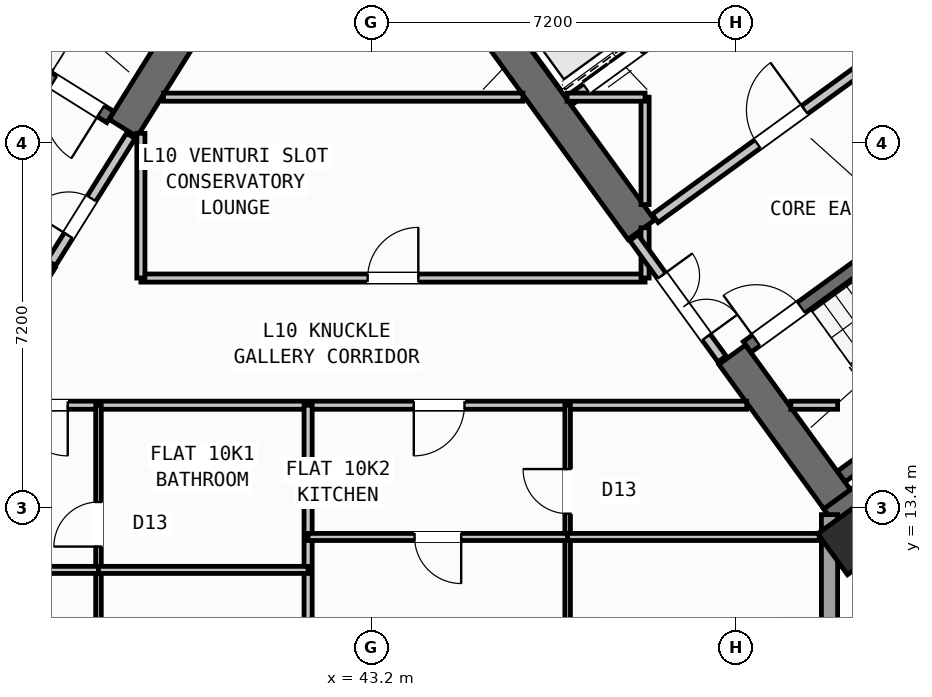
"""IFC4 building model, lengths in metres.
Left out: names, types, materials, properties, quantities, classifications, styles, units other than length and angle.
Written with IfcOpenShell. Run it as: python <this file> out.ifc"""

import sys

from ifc_helpers import new_model, si_unit, direction, frame, frame_2d, origin, origin_2d, place, context, subcontext, project, spatial, rectangle, hollow_rectangle, extrude, source, transform, mapped, element, fill, save


model = new_model("IFC4")
c1 = context("Model", 3, precision=1e-05, world=origin(), true_north=direction((0.0, 1.0)))
c2 = subcontext(c1, "Body", "Model", "MODEL_VIEW")
j1 = project(units=[si_unit("LENGTHUNIT", "METRE"), si_unit("PLANEANGLEUNIT", "RADIAN")], contexts=[c1])
p1 = place(None, origin())
s1 = spatial("IfcSite", under=j1, at=p1, CompositionType="ELEMENT")
p2 = place(p1, origin())
s2 = spatial("IfcBuilding", under=s1, at=p2, CompositionType="ELEMENT")
p3 = place(p2, frame((0.0, 0.0, 42.0)))
s3 = spatial("IfcBuildingStorey", under=s2, at=p3, CompositionType="ELEMENT", Elevation=42.0)
p4 = place(p3, frame((40.168, 23.88, 0.0), z_axis=(0.0, 0.0, 1.0), x_axis=(-0.529893103397, -0.8480644427, 0.0)))
e1 = element("IfcWall", 1, at=p4, inside=s3, PredefinedType="SHEAR", context=c2, shape_type="SweptSolid", body=[
    extrude(rectangle(XDim=3.525, YDim=0.65, at=frame_2d((1.763, 0.0))), origin(), (0.0, 0.0, 1.0), 3.35),
])
p5 = place(p3, frame((36.683, 18.304, 0.0), z_axis=(0.0, 0.0, 1.0), x_axis=(-0.529899109053, -0.848060690178, 0.0)))
e2 = element("IfcWall", 2, at=p5, inside=s3, PredefinedType="SHEAR", context=c2, shape_type="SweptSolid", body=[
    extrude(rectangle(XDim=6.375, YDim=0.65, at=frame_2d((3.188, 0.0))), origin(), (0.0, 0.0, 1.0), 3.35),
])
p6 = place(p3, frame((52.318, 13.11, 0.0), z_axis=(0.0, 0.0, 1.0), x_axis=(0.809019445368, 0.587781878776, 0.0)))
e3 = element("IfcWall", 3, at=p6, inside=s3, PredefinedType="SHEAR", context=c2, shape_type="SweptSolid", body=[
    extrude(rectangle(XDim=12.44, YDim=0.65, at=frame_2d((6.22, 0.0))), origin(), (0.0, 0.0, 1.0), 3.35),
])
p7 = place(p3, frame((52.39, 13.564, 0.0), z_axis=(0.0, 0.0, 1.0), x_axis=(-0.58779688989, 0.809008539037, 0.0)))
e4 = element("IfcWall", 4, at=p7, inside=s3, PredefinedType="SHEAR", context=c2, shape_type="SweptSolid", body=[
    extrude(rectangle(XDim=3.525, YDim=0.65, at=frame_2d((1.763, 0.0))), origin(), (0.0, 0.0, 1.0), 3.35),
])
p8 = place(p3, frame((48.526, 18.884, 0.0), z_axis=(0.0, 0.0, 1.0), x_axis=(-0.58777996584, 0.809020835181, 0.0)))
e5 = element("IfcWall", 5, at=p8, inside=s3, PredefinedType="SHEAR", context=c2, shape_type="SweptSolid", body=[
    extrude(rectangle(XDim=6.375, YDim=0.65, at=frame_2d((3.188, 0.0))), origin(), (0.0, 0.0, 1.0), 3.35),
])
m1 = source(origin(), c2, "Body", "SweptSolid", [
    extrude(hollow_rectangle(XDim=1.0, YDim=1.0, WallThickness=0.04, at=origin_2d()), origin(), (0.0, 0.0, 1.0), 3.6),
])
p9 = place(p3, frame((52.705, 12.773, 0.0), z_axis=(0.0, 0.0, 1.0), x_axis=(0.809016994375, 0.587785252292, 0.0)))
e6 = element("IfcColumn", 6, at=p9, inside=s3, PredefinedType="COLUMN", context=c2, shape_type="MappedRepresentation", body=[
    mapped(m1, transform((0.0, 0.0, 0.0), scale=1.0)),
])
p10 = place(p3, frame((56.581, 7.439, 0.0), z_axis=(0.0, 0.0, 1.0), x_axis=(-0.587785875463, 0.809016541614, 0.0)))
e7 = element("IfcWall", 7, at=p10, inside=s3, PredefinedType="STANDARD", context=c2, shape_type="SweptSolid", body=[
    extrude(rectangle(XDim=6.774, YDim=0.32, at=frame_2d((3.387, 0.0))), origin(), (0.0, 0.0, 1.0), 2.725),
])
p11 = place(p10, frame((1.556, 0.0, 0.8)))
e8 = element("IfcOpeningElement", 8, at=p11, cuts=e7, PredefinedType="OPENING", context=c2, shape_type="SweptSolid", body=[
    extrude(rectangle(XDim=2.1, YDim=1.55, at=frame_2d((1.05, 0.775))), frame((0.0, 0.17, 0.0), z_axis=(0.0, -1.0, 0.0), x_axis=(1.0, 0.0, 0.0)), (0.0, 0.0, 1.0), 0.34),
])
p12 = place(p3, frame((52.24, 13.261, 0.0), z_axis=(0.0, 0.0, 1.0), x_axis=(0.0, -1.0, 0.0)))
e9 = element("IfcWall", 9, at=p12, inside=s3, PredefinedType="STANDARD", context=c2, shape_type="SweptSolid", body=[
    extrude(rectangle(XDim=9.795, YDim=0.32, at=frame_2d((4.897, 0.0))), origin(), (0.0, 0.0, 1.0), 3.35),
])
p13 = place(p12, frame((2.199, 0.0, 0.8)))
e10 = element("IfcOpeningElement", 10, at=p13, cuts=e9, PredefinedType="OPENING", context=c2, shape_type="SweptSolid", body=[
    extrude(rectangle(XDim=2.1, YDim=1.55, at=frame_2d((1.05, 0.775))), frame((0.0, 0.17, 0.0), z_axis=(0.0, -1.0, 0.0), x_axis=(1.0, 0.0, 0.0)), (0.0, 0.0, 1.0), 0.34),
])
p14 = place(p12, frame((6.88, 0.0, 0.85)))
e11 = element("IfcOpeningElement", 11, at=p14, cuts=e9, PredefinedType="OPENING", context=c2, shape_type="SweptSolid", body=[
    extrude(rectangle(XDim=1.8, YDim=1.5, at=frame_2d((0.9, 0.75))), frame((0.0, 0.17, 0.0), z_axis=(0.0, -1.0, 0.0), x_axis=(1.0, 0.0, 0.0)), (0.0, 0.0, 1.0), 0.34),
])
p15 = place(p3, frame((38.046, 21.108, 0.0), z_axis=(0.0, 0.0, 1.0), x_axis=(-0.848054434086, 0.529909121291, 0.0)))
e12 = element("IfcWall", 12, at=p15, inside=s3, PredefinedType="SHEAR", context=c2, shape_type="SweptSolid", body=[
    extrude(rectangle(XDim=7.33, YDim=0.26, at=frame_2d((3.665, 0.0))), origin(), (0.0, 0.0, 1.0), 3.35),
])
p16 = place(p15, frame((0.22, 0.0, 0.0)))
e13 = element("IfcOpeningElement", 13, at=p16, cuts=e12, PredefinedType="OPENING", context=c2, shape_type="SweptSolid", body=[
    extrude(rectangle(XDim=1.1, YDim=2.1, at=frame_2d((0.55, 1.05))), frame((0.0, 0.14, 0.0), z_axis=(0.0, -1.0, 0.0), x_axis=(1.0, 0.0, 0.0)), (0.0, 0.0, 1.0), 0.28),
])
p17 = place(p3, frame((52.472, 14.013, 0.0), z_axis=(0.0, 0.0, 1.0), x_axis=(0.809028366311, 0.587769599847, 0.0)))
e14 = element("IfcWall", 14, at=p17, inside=s3, PredefinedType="SHEAR", context=c2, shape_type="SweptSolid", body=[
    extrude(rectangle(XDim=7.33, YDim=0.26, at=frame_2d((3.665, 0.0))), origin(), (0.0, 0.0, 1.0), 3.35),
])
p18 = place(p3, frame((50.615, 16.57, 0.0), z_axis=(0.0, 0.0, 1.0), x_axis=(0.809028366311, 0.587769599847, 0.0)))
e15 = element("IfcWall", 15, at=p18, inside=s3, PredefinedType="SHEAR", context=c2, shape_type="SweptSolid", body=[
    extrude(rectangle(XDim=7.33, YDim=0.26, at=frame_2d((3.665, 0.0))), origin(), (0.0, 0.0, 1.0), 3.35),
])
p19 = place(p18, frame((0.22, 0.0, 0.0)))
e16 = element("IfcOpeningElement", 16, at=p19, cuts=e15, PredefinedType="OPENING", context=c2, shape_type="SweptSolid", body=[
    extrude(rectangle(XDim=1.1, YDim=2.1, at=frame_2d((0.55, 1.05))), frame((0.0, 0.14, 0.0), z_axis=(0.0, -1.0, 0.0), x_axis=(1.0, 0.0, 0.0)), (0.0, 0.0, 1.0), 0.28),
])
p20 = place(p3, frame((47.106, 21.437, 0.0), z_axis=(0.0, 0.0, 1.0), x_axis=(0.809012514015, 0.58779141893, 0.0)))
e17 = element("IfcWall", 17, at=p20, inside=s3, PredefinedType="STANDARD", context=c2, shape_type="SweptSolid", body=[
    extrude(rectangle(XDim=3.398, YDim=0.2, at=frame_2d((1.699, 0.0))), origin(), (0.0, 0.0, 1.0), 3.34),
])
p21 = place(p20, frame((0.408, 0.0, 0.0)))
e18 = element("IfcOpeningElement", 18, at=p21, cuts=e17, PredefinedType="OPENING", context=c2, shape_type="SweptSolid", body=[
    extrude(rectangle(XDim=1.3, YDim=2.2, at=frame_2d((0.65, 1.1))), frame((0.0, 0.11, 0.0), z_axis=(0.0, -1.0, 0.0), x_axis=(1.0, 0.0, 0.0)), (0.0, 0.0, 1.0), 0.22),
])
p22 = place(p3, frame((48.799, 19.107, 0.0), z_axis=(0.0, 0.0, 1.0), x_axis=(0.809012959416, 0.587790805897, 0.0)))
e19 = element("IfcWall", 19, at=p22, inside=s3, PredefinedType="STANDARD", context=c2, shape_type="SweptSolid", body=[
    extrude(rectangle(XDim=5.718, YDim=0.2, at=frame_2d((2.859, 0.0))), origin(), (0.0, 0.0, 1.0), 3.34),
])
p23 = place(p22, frame((2.498, 0.0, 0.0)))
e20 = element("IfcOpeningElement", 20, at=p23, cuts=e19, PredefinedType="OPENING", context=c2, shape_type="SweptSolid", body=[
    extrude(rectangle(XDim=1.15, YDim=2.1, at=frame_2d((0.575, 1.05))), frame((0.0, 0.11, 0.0), z_axis=(0.0, -1.0, 0.0), x_axis=(1.0, 0.0, 0.0)), (0.0, 0.0, 1.0), 0.22),
])
p24 = place(p3, frame((38.451, 20.737, 0.0), z_axis=(0.0, 0.0, 1.0), x_axis=(-0.529924799939, -0.848044637038, 0.0)))
e21 = element("IfcWall", 21, at=p24, inside=s3, PredefinedType="STANDARD", context=c2, shape_type="SweptSolid", body=[
    extrude(rectangle(XDim=2.96, YDim=0.2, at=frame_2d((1.48, 0.0))), origin(), (0.0, 0.0, 1.0), 3.34),
])
p25 = place(p24, frame((1.46, 0.0, 0.0)))
e22 = element("IfcOpeningElement", 22, at=p25, cuts=e21, PredefinedType="OPENING", context=c2, shape_type="SweptSolid", body=[
    extrude(rectangle(XDim=0.86, YDim=2.05, at=frame_2d((0.43, 1.025))), frame((0.0, 0.11, 0.0), z_axis=(0.0, -1.0, 0.0), x_axis=(1.0, 0.0, 0.0)), (0.0, 0.0, 1.0), 0.22),
])
p26 = place(p3, frame((35.296, 15.42, 0.0), z_axis=(0.0, 0.0, 1.0), x_axis=(1.0, 0.0, 0.0)))
e23 = element("IfcWall", 23, at=p26, inside=s3, PredefinedType="PARTITIONING", context=c2, shape_type="SweptSolid", body=[
    extrude(rectangle(XDim=15.311, YDim=0.16, at=frame_2d((7.655, 0.0))), origin(), (0.0, 0.0, 1.0), 3.34),
])
p27 = place(p26, frame((0.91, 0.0, 0.0)))
e24 = element("IfcOpeningElement", 24, at=p27, cuts=e23, PredefinedType="OPENING", context=c2, shape_type="SweptSolid", body=[
    extrude(rectangle(XDim=1.0, YDim=2.1, at=frame_2d((0.5, 1.05))), frame((0.0, 0.09, 0.0), z_axis=(0.0, -1.0, 0.0), x_axis=(1.0, 0.0, 0.0)), (0.0, 0.0, 1.0), 0.18),
])
p28 = place(p26, frame((8.74, 0.0, 0.0)))
e25 = element("IfcOpeningElement", 25, at=p28, cuts=e23, PredefinedType="OPENING", context=c2, shape_type="SweptSolid", body=[
    extrude(rectangle(XDim=1.0, YDim=2.1, at=frame_2d((0.5, 1.05))), frame((0.0, 0.09, 0.0), z_axis=(0.0, -1.0, 0.0), x_axis=(1.0, 0.0, 0.0)), (0.0, 0.0, 1.0), 0.18),
])
p29 = place(p3, frame((51.477, 15.42, 0.0), z_axis=(0.0, 0.0, 1.0), x_axis=(1.0, 0.0, 0.0)))
e26 = element("IfcWall", 26, at=p29, inside=s3, PredefinedType="PARTITIONING", context=c2, shape_type="SweptSolid", body=[
    extrude(rectangle(XDim=0.923, YDim=0.16, at=frame_2d((0.461, 0.0))), origin(), (0.0, 0.0, 1.0), 3.34),
])
p30 = place(p3, frame((38.65, 17.93, 0.0), z_axis=(0.0, 0.0, 1.0), x_axis=(1.0, 0.0, 0.0)))
e27 = element("IfcWall", 27, at=p30, inside=s3, PredefinedType="PARTITIONING", context=c2, shape_type="SweptSolid", body=[
    extrude(rectangle(XDim=9.95, YDim=0.16, at=frame_2d((4.975, 0.0))), origin(), (0.0, 0.0, 1.0), 3.34),
])
p31 = place(p30, frame((4.475, 0.0, 0.0)))
e28 = element("IfcOpeningElement", 28, at=p31, cuts=e27, PredefinedType="OPENING", context=c2, shape_type="SweptSolid", body=[
    extrude(rectangle(XDim=1.0, YDim=2.1, at=frame_2d((0.5, 1.05))), frame((0.0, 0.09, 0.0), z_axis=(0.0, -1.0, 0.0), x_axis=(1.0, 0.0, 0.0)), (0.0, 0.0, 1.0), 0.18),
])
p32 = place(p3, frame((38.65, 17.93, 0.0), z_axis=(0.0, 0.0, 1.0), x_axis=(0.0, 1.0, 0.0)))
e29 = element("IfcWall", 29, at=p32, inside=s3, PredefinedType="PARTITIONING", context=c2, shape_type="SweptSolid", body=[
    extrude(rectangle(XDim=2.857, YDim=0.16, at=frame_2d((1.428, 0.0))), origin(), (0.0, 0.0, 1.0), 3.34),
])
p33 = place(p3, frame((48.6, 17.93, 0.0), z_axis=(0.0, 0.0, 1.0), x_axis=(0.0, 1.0, 0.0)))
e30 = element("IfcWall", 30, at=p33, inside=s3, PredefinedType="PARTITIONING", context=c2, shape_type="SweptSolid", body=[
    extrude(rectangle(XDim=0.993, YDim=0.16, at=frame_2d((0.496, 0.0))), origin(), (0.0, 0.0, 1.0), 3.34),
])
p34 = place(p3, frame((48.6, 19.38, 0.0), z_axis=(0.0, 0.0, 1.0), x_axis=(0.0, 1.0, 0.0)))
e31 = element("IfcWall", 31, at=p34, inside=s3, PredefinedType="PARTITIONING", context=c2, shape_type="SweptSolid", body=[
    extrude(rectangle(XDim=2.12, YDim=0.16, at=frame_2d((1.06, 0.0))), origin(), (0.0, 0.0, 1.0), 3.34),
])
p35 = place(p3, frame((39.095, 21.5, 0.0), z_axis=(0.0, 0.0, 1.0), x_axis=(1.0, 0.0, 0.0)))
e32 = element("IfcWall", 32, at=p35, inside=s3, PredefinedType="PARTITIONING", context=c2, shape_type="SweptSolid", body=[
    extrude(rectangle(XDim=7.094, YDim=0.16, at=frame_2d((3.547, 0.0))), origin(), (0.0, 0.0, 1.0), 3.34),
])
p36 = place(p3, frame((47.06, 21.5, 0.0), z_axis=(0.0, 0.0, 1.0), x_axis=(1.0, 0.0, 0.0)))
e33 = element("IfcWall", 33, at=p36, inside=s3, PredefinedType="PARTITIONING", context=c2, shape_type="SweptSolid", body=[
    extrude(rectangle(XDim=1.54, YDim=0.16, at=frame_2d((0.77, 0.0))), origin(), (0.0, 0.0, 1.0), 3.34),
])
p37 = place(p3, frame((50.119, 16.333, 0.0), z_axis=(0.0, 0.0, 1.0), x_axis=(-0.587749856981, 0.809042709391, 0.0)))
e34 = element("IfcWall", 34, at=p37, inside=s3, PredefinedType="STANDARD", context=c2, shape_type="SweptSolid", body=[
    extrude(rectangle(XDim=2.96, YDim=0.2, at=frame_2d((1.48, 0.0))), origin(), (0.0, 0.0, 1.0), 3.34),
])
p38 = place(p37, frame((0.53, 0.0, 0.0)))
e35 = element("IfcOpeningElement", 35, at=p38, cuts=e34, PredefinedType="OPENING", context=c2, shape_type="SweptSolid", body=[
    extrude(rectangle(XDim=1.5, YDim=2.15, at=frame_2d((0.75, 1.075))), frame((0.0, 0.11, 0.0), z_axis=(0.0, -1.0, 0.0), x_axis=(1.0, 0.0, 0.0)), (0.0, 0.0, 1.0), 0.22),
])
p39 = place(p3, frame((41.95, 1.96, 0.0), z_axis=(0.0, 0.0, 1.0), x_axis=(0.0, 1.0, 0.0)))
e36 = element("IfcWall", 36, at=p39, inside=s3, PredefinedType="PARTITIONING", context=c2, shape_type="SweptSolid", body=[
    extrude(rectangle(XDim=13.46, YDim=0.16, at=frame_2d((6.73, 0.0))), origin(), (0.0, 0.0, 1.0), 3.34),
])
p40 = place(p3, frame((37.813, 1.96, 0.0), z_axis=(0.0, 0.0, 1.0), x_axis=(0.0, 1.0, 0.0)))
e37 = element("IfcWall", 37, at=p40, inside=s3, PredefinedType="PARTITIONING", context=c2, shape_type="SweptSolid", body=[
    extrude(rectangle(XDim=13.46, YDim=0.11, at=frame_2d((6.73, 0.0))), origin(), (0.0, 0.0, 1.0), 3.34),
])
p41 = place(p40, frame((5.5, 0.0, 0.0)))
e38 = element("IfcOpeningElement", 38, at=p41, cuts=e37, PredefinedType="OPENING", context=c2, shape_type="SweptSolid", body=[
    extrude(rectangle(XDim=0.92, YDim=2.08, at=frame_2d((0.46, 1.04))), frame((0.0, 0.065, 0.0), z_axis=(0.0, -1.0, 0.0), x_axis=(1.0, 0.0, 0.0)), (0.0, 0.0, 1.0), 0.13),
])
p42 = place(p40, frame((10.67, 0.0, 0.0)))
e39 = element("IfcOpeningElement", 39, at=p42, cuts=e37, PredefinedType="OPENING", context=c2, shape_type="SweptSolid", body=[
    extrude(rectangle(XDim=0.88, YDim=2.08, at=frame_2d((0.44, 1.04))), frame((0.0, 0.065, 0.0), z_axis=(0.0, -1.0, 0.0), x_axis=(1.0, 0.0, 0.0)), (0.0, 0.0, 1.0), 0.13),
])
p43 = place(p3, frame((33.702, 12.17, 0.0), z_axis=(0.0, 0.0, 1.0), x_axis=(1.0, 0.0, 0.0)))
e40 = element("IfcWall", 40, at=p43, inside=s3, PredefinedType="PLUMBINGWALL", context=c2, shape_type="SweptSolid", body=[
    extrude(rectangle(XDim=4.111, YDim=0.14, at=frame_2d((2.056, 0.0))), origin(), (0.0, 0.0, 1.0), 2.525),
])
p44 = place(p43, frame((0.795, 0.0, 0.0)))
e41 = element("IfcOpeningElement", 41, at=p44, cuts=e40, PredefinedType="OPENING", context=c2, shape_type="SweptSolid", body=[
    extrude(rectangle(XDim=0.92, YDim=2.08, at=frame_2d((0.46, 1.04))), frame((0.0, 0.08, 0.0), z_axis=(0.0, -1.0, 0.0), x_axis=(1.0, 0.0, 0.0)), (0.0, 0.0, 1.0), 0.16),
])
p45 = place(p3, frame((37.813, 12.17, 0.0), z_axis=(0.0, 0.0, 1.0), x_axis=(1.0, 0.0, 0.0)))
e42 = element("IfcWall", 42, at=p45, inside=s3, PredefinedType="PLUMBINGWALL", context=c2, shape_type="SweptSolid", body=[
    extrude(rectangle(XDim=4.137, YDim=0.14, at=frame_2d((2.068, 0.0))), origin(), (0.0, 0.0, 1.0), 2.525),
])
p46 = place(p3, frame((47.072, 1.96, 0.0), z_axis=(0.0, 0.0, 1.0), x_axis=(0.0, 1.0, 0.0)))
e43 = element("IfcWall", 43, at=p46, inside=s3, PredefinedType="PARTITIONING", context=c2, shape_type="SweptSolid", body=[
    extrude(rectangle(XDim=13.46, YDim=0.11, at=frame_2d((6.73, 0.0))), origin(), (0.0, 0.0, 1.0), 3.34),
])
p47 = place(p46, frame((6.6, 0.0, 0.0)))
e44 = element("IfcOpeningElement", 44, at=p47, cuts=e43, PredefinedType="OPENING", context=c2, shape_type="SweptSolid", body=[
    extrude(rectangle(XDim=0.92, YDim=2.08, at=frame_2d((0.46, 1.04))), frame((0.0, 0.065, 0.0), z_axis=(0.0, -1.0, 0.0), x_axis=(1.0, 0.0, 0.0)), (0.0, 0.0, 1.0), 0.13),
])
p48 = place(p46, frame((11.32, 0.0, 0.0)))
e45 = element("IfcOpeningElement", 45, at=p48, cuts=e43, PredefinedType="OPENING", context=c2, shape_type="SweptSolid", body=[
    extrude(rectangle(XDim=0.88, YDim=2.08, at=frame_2d((0.44, 1.04))), frame((0.0, 0.065, 0.0), z_axis=(0.0, -1.0, 0.0), x_axis=(1.0, 0.0, 0.0)), (0.0, 0.0, 1.0), 0.13),
])
p49 = place(p3, frame((41.95, 12.82, 0.0), z_axis=(0.0, 0.0, 1.0), x_axis=(1.0, 0.0, 0.0)))
e46 = element("IfcWall", 46, at=p49, inside=s3, PredefinedType="PLUMBINGWALL", context=c2, shape_type="SweptSolid", body=[
    extrude(rectangle(XDim=5.122, YDim=0.14, at=frame_2d((2.561, 0.0))), origin(), (0.0, 0.0, 1.0), 2.525),
])
p50 = place(p49, frame((2.101, 0.0, 0.0)))
e47 = element("IfcOpeningElement", 47, at=p50, cuts=e46, PredefinedType="OPENING", context=c2, shape_type="SweptSolid", body=[
    extrude(rectangle(XDim=0.92, YDim=2.08, at=frame_2d((0.46, 1.04))), frame((0.0, 0.08, 0.0), z_axis=(0.0, -1.0, 0.0), x_axis=(1.0, 0.0, 0.0)), (0.0, 0.0, 1.0), 0.16),
])
p51 = place(p3, frame((47.072, 12.82, 0.0), z_axis=(0.0, 0.0, 1.0), x_axis=(1.0, 0.0, 0.0)))
e48 = element("IfcWall", 48, at=p51, inside=s3, PredefinedType="PLUMBINGWALL", context=c2, shape_type="SweptSolid", body=[
    extrude(rectangle(XDim=4.967, YDim=0.14, at=frame_2d((2.483, 0.0))), origin(), (0.0, 0.0, 1.0), 2.525),
])
m2 = source(origin(), c2, "Body", "SweptSolid", [
    extrude(rectangle(XDim=1.1, YDim=2.1, at=frame_2d((0.55, 1.05))), frame((0.0, 0.025, 0.0), z_axis=(0.0, -1.0, 0.0), x_axis=(1.0, 0.0, 0.0)), (0.0, 0.0, 1.0), 0.05),
])
p52 = place(p16, origin())
e49 = element("IfcDoor", 49, at=p52, inside=s3, OperationType="SINGLE_SWING_LEFT", PredefinedType="DOOR", context=c2, shape_type="MappedRepresentation", body=[
    mapped(m2, transform((0.0, 0.0, 0.0), scale=1.0)),
])
fill(e13, e49)
p53 = place(p19, origin())
e50 = element("IfcDoor", 50, at=p53, inside=s3, OperationType="SINGLE_SWING_LEFT", PredefinedType="DOOR", context=c2, shape_type="MappedRepresentation", body=[
    mapped(m2, transform((0.0, 0.0, 0.0), scale=1.0)),
])
fill(e16, e50)
m3 = source(origin(), c2, "Body", "SweptSolid", [
    extrude(rectangle(XDim=1.15, YDim=2.1, at=frame_2d((0.575, 1.05))), frame((0.0, 0.025, 0.0), z_axis=(0.0, -1.0, 0.0), x_axis=(1.0, 0.0, 0.0)), (0.0, 0.0, 1.0), 0.05),
])
p54 = place(p23, origin())
e51 = element("IfcDoor", 51, at=p54, inside=s3, OperationType="SINGLE_SWING_RIGHT", PredefinedType="DOOR", context=c2, shape_type="MappedRepresentation", body=[
    mapped(m3, transform((0.0, 0.0, 0.0), scale=1.0)),
])
fill(e20, e51)
m4 = source(origin(), c2, "Body", "SweptSolid", [
    extrude(rectangle(XDim=1.3, YDim=2.2, at=frame_2d((0.65, 1.1))), frame((0.0, 0.025, 0.0), z_axis=(0.0, -1.0, 0.0), x_axis=(1.0, 0.0, 0.0)), (0.0, 0.0, 1.0), 0.05),
])
p55 = place(p21, origin())
e52 = element("IfcDoor", 52, at=p55, inside=s3, OperationType="DOUBLE_DOOR_SLIDING", PredefinedType="DOOR", context=c2, shape_type="MappedRepresentation", body=[
    mapped(m4, transform((0.0, 0.0, 0.0), scale=1.0)),
])
fill(e18, e52)
m5 = source(origin(), c2, "Body", "SweptSolid", [
    extrude(rectangle(XDim=1.0, YDim=2.1, at=frame_2d((0.5, 1.05))), frame((0.0, 0.025, 0.0), z_axis=(0.0, -1.0, 0.0), x_axis=(1.0, 0.0, 0.0)), (0.0, 0.0, 1.0), 0.05),
])
p56 = place(p31, origin())
e53 = element("IfcDoor", 53, at=p56, inside=s3, OperationType="SINGLE_SWING_RIGHT", PredefinedType="DOOR", context=c2, shape_type="MappedRepresentation", body=[
    mapped(m5, transform((0.0, 0.0, 0.0), scale=1.0)),
])
fill(e28, e53)
m6 = source(origin(), c2, "Body", "SweptSolid", [
    extrude(rectangle(XDim=0.86, YDim=2.05, at=frame_2d((0.43, 1.025))), frame((0.0, 0.025, 0.0), z_axis=(0.0, -1.0, 0.0), x_axis=(1.0, 0.0, 0.0)), (0.0, 0.0, 1.0), 0.05),
])
p57 = place(p25, frame((0.86, 0.0, 0.0), z_axis=(0.0, 0.0, 1.0), x_axis=(-1.0, 0.0, 0.0)))
e54 = element("IfcDoor", 54, at=p57, inside=s3, OperationType="SINGLE_SWING_LEFT", PredefinedType="DOOR", context=c2, shape_type="MappedRepresentation", body=[
    mapped(m6, transform((0.0, 0.0, 0.0), scale=1.0)),
])
fill(e22, e54)
m7 = source(origin(), c2, "Body", "SweptSolid", [
    extrude(rectangle(XDim=1.5, YDim=2.15, at=frame_2d((0.75, 1.075))), frame((0.0, 0.025, 0.0), z_axis=(0.0, -1.0, 0.0), x_axis=(1.0, 0.0, 0.0)), (0.0, 0.0, 1.0), 0.05),
])
p58 = place(p38, frame((1.5, 0.0, 0.0), z_axis=(0.0, 0.0, 1.0), x_axis=(-1.0, 0.0, 0.0)))
e55 = element("IfcDoor", 55, at=p58, inside=s3, OperationType="DOUBLE_DOOR_SINGLE_SWING", PredefinedType="DOOR", context=c2, shape_type="MappedRepresentation", body=[
    mapped(m7, transform((0.0, 0.0, 0.0), scale=1.0)),
])
fill(e35, e55)
p59 = place(p27, frame((1.0, 0.0, 0.0), z_axis=(0.0, 0.0, 1.0), x_axis=(-1.0, 0.0, 0.0)))
e56 = element("IfcDoor", 56, at=p59, inside=s3, OperationType="SINGLE_SWING_LEFT", PredefinedType="DOOR", context=c2, shape_type="MappedRepresentation", body=[
    mapped(m5, transform((0.0, 0.0, 0.0), scale=1.0)),
])
fill(e24, e56)
m8 = source(origin(), c2, "Body", "SweptSolid", [
    extrude(rectangle(XDim=0.88, YDim=2.08, at=frame_2d((0.44, 1.04))), frame((0.0, 0.025, 0.0), z_axis=(0.0, -1.0, 0.0), x_axis=(1.0, 0.0, 0.0)), (0.0, 0.0, 1.0), 0.05),
])
p60 = place(p42, origin())
e57 = element("IfcDoor", 57, at=p60, inside=s3, OperationType="SINGLE_SWING_LEFT", PredefinedType="DOOR", context=c2, shape_type="MappedRepresentation", body=[
    mapped(m8, transform((0.0, 0.0, 0.0), scale=1.0)),
])
fill(e39, e57)
p61 = place(p28, frame((1.0, 0.0, 0.0), z_axis=(0.0, 0.0, 1.0), x_axis=(-1.0, 0.0, 0.0)))
e58 = element("IfcDoor", 58, at=p61, inside=s3, OperationType="SINGLE_SWING_RIGHT", PredefinedType="DOOR", context=c2, shape_type="MappedRepresentation", body=[
    mapped(m5, transform((0.0, 0.0, 0.0), scale=1.0)),
])
fill(e25, e58)
m9 = source(origin(), c2, "Body", "SweptSolid", [
    extrude(rectangle(XDim=0.92, YDim=2.08, at=frame_2d((0.46, 1.04))), frame((0.0, 0.025, 0.0), z_axis=(0.0, -1.0, 0.0), x_axis=(1.0, 0.0, 0.0)), (0.0, 0.0, 1.0), 0.05),
])
p62 = place(p50, frame((0.92, 0.0, 0.0), z_axis=(0.0, 0.0, 1.0), x_axis=(-1.0, 0.0, 0.0)))
e59 = element("IfcDoor", 59, at=p62, inside=s3, OperationType="SINGLE_SWING_LEFT", PredefinedType="DOOR", context=c2, shape_type="MappedRepresentation", body=[
    mapped(m9, transform((0.0, 0.0, 0.0), scale=1.0)),
])
fill(e47, e59)
p63 = place(p48, origin())
e60 = element("IfcDoor", 60, at=p63, inside=s3, OperationType="SINGLE_SWING_RIGHT", PredefinedType="DOOR", context=c2, shape_type="MappedRepresentation", body=[
    mapped(m8, transform((0.0, 0.0, 0.0), scale=1.0)),
])
fill(e45, e60)
save(model, sys.argv[1])
